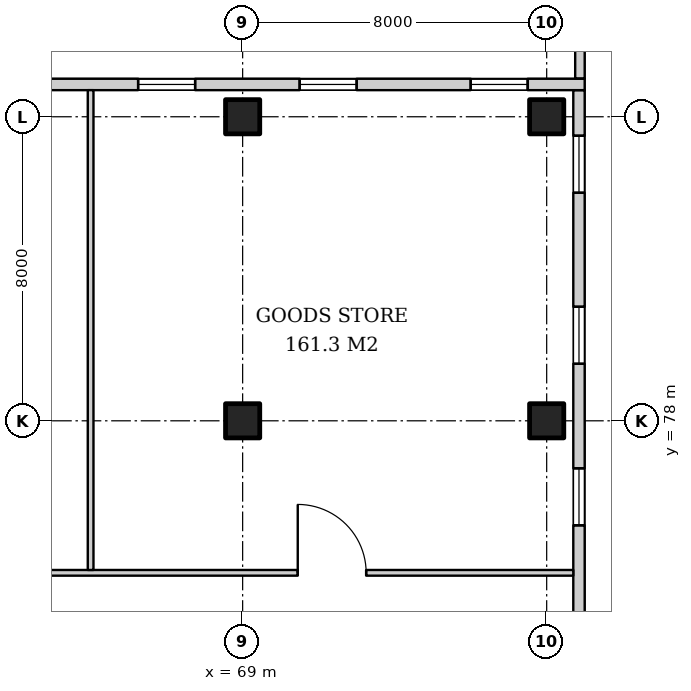
"""IFC4 building model, lengths in metres.
Left out: names, types, materials, properties, quantities, classifications, styles, units other than length and angle.
Written with IfcOpenShell. Run it as: python <this file> out.ifc"""

import sys

from ifc_helpers import new_model, si_unit, direction, frame, frame_2d, origin, origin_2d, place, context, subcontext, project, spatial, rectangle, extrude, element, fill, save


model = new_model("IFC4")
c1 = context("Model", 3, precision=1e-05, world=origin(), true_north=direction((0.0, 1.0)))
c2 = subcontext(c1, "Body", "Model", "MODEL_VIEW")
j1 = project(units=[si_unit("LENGTHUNIT", "METRE"), si_unit("PLANEANGLEUNIT", "RADIAN")], contexts=[c1])
p1 = place(None, origin())
s1 = spatial("IfcSite", under=j1, at=p1, CompositionType="ELEMENT")
p2 = place(p1, origin())
s2 = spatial("IfcBuilding", under=s1, at=p2, CompositionType="ELEMENT")
p3 = place(p2, frame((0.0, 0.0, 6.0)))
s3 = spatial("IfcBuildingStorey", under=s2, at=p3, CompositionType="ELEMENT", Elevation=6.0)
for number, where, z_axis, x_axis in (
    (1, (69.0, 78.0, 0.0), (0.0, 0.0, 1.0), (1.0, 0.0, 0.0)),
    (2, (69.0, 86.0, 0.0), (0.0, 0.0, 1.0), (1.0, 0.0, 0.0)),
    (3, (77.0, 78.0, 0.0), (0.0, 0.0, 1.0), (1.0, 0.0, 0.0)),
    (4, (77.0, 86.0, 0.0), (0.0, 0.0, 1.0), (1.0, 0.0, 0.0)),
):
    element("IfcColumn", number, at=place(p3, frame(where, z_axis=z_axis, x_axis=x_axis)), inside=s3, PredefinedType="COLUMN", context=c2, shape_type="SweptSolid", body=[
        extrude(rectangle(XDim=0.9, YDim=0.9, at=origin_2d()), origin(), (0.0, 0.0, 1.0), 5.0),
    ])
p4 = place(p3, frame((77.85, 50.5, 0.0), z_axis=(0.0, 0.0, 1.0), x_axis=(0.0, 1.0, 0.0)))
e5 = element("IfcWall", 5, at=p4, inside=s3, PredefinedType="SOLIDWALL", context=c2, shape_type="SweptSolid", body=[
    extrude(rectangle(XDim=36.2, YDim=0.3, at=frame_2d((18.1, 0.0))), origin(), (0.0, 0.0, 1.0), 4.7),
])
p5 = place(p4, frame((0.75, 0.0, 0.9)))
e6 = element("IfcOpeningElement", 6, at=p5, cuts=e5, PredefinedType="OPENING", context=c2, shape_type="SweptSolid", body=[
    extrude(rectangle(XDim=1.5, YDim=3.2, at=frame_2d((0.75, 1.6))), frame((0.0, 0.16, 0.0), z_axis=(0.0, -1.0, 0.0), x_axis=(1.0, 0.0, 0.0)), (0.0, 0.0, 1.0), 0.32),
])
p6 = place(p4, frame((4.75, 0.0, 0.9)))
e7 = element("IfcOpeningElement", 7, at=p6, cuts=e5, PredefinedType="OPENING", context=c2, shape_type="SweptSolid", body=[
    extrude(rectangle(XDim=1.5, YDim=3.2, at=frame_2d((0.75, 1.6))), frame((0.0, 0.16, 0.0), z_axis=(0.0, -1.0, 0.0), x_axis=(1.0, 0.0, 0.0)), (0.0, 0.0, 1.0), 0.32),
])
p7 = place(p4, frame((8.75, 0.0, 0.9)))
e8 = element("IfcOpeningElement", 8, at=p7, cuts=e5, PredefinedType="OPENING", context=c2, shape_type="SweptSolid", body=[
    extrude(rectangle(XDim=1.5, YDim=3.2, at=frame_2d((0.75, 1.6))), frame((0.0, 0.16, 0.0), z_axis=(0.0, -1.0, 0.0), x_axis=(1.0, 0.0, 0.0)), (0.0, 0.0, 1.0), 0.32),
])
p8 = place(p4, frame((12.75, 0.0, 0.9)))
e9 = element("IfcOpeningElement", 9, at=p8, cuts=e5, PredefinedType="OPENING", context=c2, shape_type="SweptSolid", body=[
    extrude(rectangle(XDim=1.5, YDim=3.2, at=frame_2d((0.75, 1.6))), frame((0.0, 0.16, 0.0), z_axis=(0.0, -1.0, 0.0), x_axis=(1.0, 0.0, 0.0)), (0.0, 0.0, 1.0), 0.32),
])
p9 = place(p4, frame((16.75, 0.0, 0.9)))
e10 = element("IfcOpeningElement", 10, at=p9, cuts=e5, PredefinedType="OPENING", context=c2, shape_type="SweptSolid", body=[
    extrude(rectangle(XDim=1.5, YDim=3.2, at=frame_2d((0.75, 1.6))), frame((0.0, 0.16, 0.0), z_axis=(0.0, -1.0, 0.0), x_axis=(1.0, 0.0, 0.0)), (0.0, 0.0, 1.0), 0.32),
])
p10 = place(p4, frame((20.75, 0.0, 0.9)))
e11 = element("IfcOpeningElement", 11, at=p10, cuts=e5, PredefinedType="OPENING", context=c2, shape_type="SweptSolid", body=[
    extrude(rectangle(XDim=1.5, YDim=3.2, at=frame_2d((0.75, 1.6))), frame((0.0, 0.16, 0.0), z_axis=(0.0, -1.0, 0.0), x_axis=(1.0, 0.0, 0.0)), (0.0, 0.0, 1.0), 0.32),
])
p11 = place(p4, frame((24.75, 0.0, 0.9)))
e12 = element("IfcOpeningElement", 12, at=p11, cuts=e5, PredefinedType="OPENING", context=c2, shape_type="SweptSolid", body=[
    extrude(rectangle(XDim=1.5, YDim=3.2, at=frame_2d((0.75, 1.6))), frame((0.0, 0.16, 0.0), z_axis=(0.0, -1.0, 0.0), x_axis=(1.0, 0.0, 0.0)), (0.0, 0.0, 1.0), 0.32),
])
p12 = place(p4, frame((29.0, 0.0, 0.9)))
e13 = element("IfcOpeningElement", 13, at=p12, cuts=e5, PredefinedType="OPENING", context=c2, shape_type="SweptSolid", body=[
    extrude(rectangle(XDim=1.5, YDim=3.2, at=frame_2d((0.75, 1.6))), frame((0.0, 0.16, 0.0), z_axis=(0.0, -1.0, 0.0), x_axis=(1.0, 0.0, 0.0)), (0.0, 0.0, 1.0), 0.32),
])
p13 = place(p4, frame((33.5, 0.0, 0.9)))
e14 = element("IfcOpeningElement", 14, at=p13, cuts=e5, PredefinedType="OPENING", context=c2, shape_type="SweptSolid", body=[
    extrude(rectangle(XDim=1.5, YDim=3.2, at=frame_2d((0.75, 1.6))), frame((0.0, 0.16, 0.0), z_axis=(0.0, -1.0, 0.0), x_axis=(1.0, 0.0, 0.0)), (0.0, 0.0, 1.0), 0.32),
])
p14 = place(p3, frame((78.0, 86.85, 0.0), z_axis=(0.0, 0.0, 1.0), x_axis=(-1.0, 0.0, 0.0)))
e15 = element("IfcWall", 15, at=p14, inside=s3, PredefinedType="SOLIDWALL", context=c2, shape_type="SweptSolid", body=[
    extrude(rectangle(XDim=66.0, YDim=0.3, at=frame_2d((33.0, 0.0))), origin(), (0.0, 0.0, 1.0), 4.7),
])
p15 = place(p14, frame((1.5, 0.0, 0.9)))
e16 = element("IfcOpeningElement", 16, at=p15, cuts=e15, PredefinedType="OPENING", context=c2, shape_type="SweptSolid", body=[
    extrude(rectangle(XDim=1.5, YDim=3.2, at=frame_2d((0.75, 1.6))), frame((0.0, 0.16, 0.0), z_axis=(0.0, -1.0, 0.0), x_axis=(1.0, 0.0, 0.0)), (0.0, 0.0, 1.0), 0.32),
])
p16 = place(p14, frame((6.0, 0.0, 0.9)))
e17 = element("IfcOpeningElement", 17, at=p16, cuts=e15, PredefinedType="OPENING", context=c2, shape_type="SweptSolid", body=[
    extrude(rectangle(XDim=1.5, YDim=3.2, at=frame_2d((0.75, 1.6))), frame((0.0, 0.16, 0.0), z_axis=(0.0, -1.0, 0.0), x_axis=(1.0, 0.0, 0.0)), (0.0, 0.0, 1.0), 0.32),
])
p17 = place(p14, frame((10.25, 0.0, 0.9)))
e18 = element("IfcOpeningElement", 18, at=p17, cuts=e15, PredefinedType="OPENING", context=c2, shape_type="SweptSolid", body=[
    extrude(rectangle(XDim=1.5, YDim=3.2, at=frame_2d((0.75, 1.6))), frame((0.0, 0.16, 0.0), z_axis=(0.0, -1.0, 0.0), x_axis=(1.0, 0.0, 0.0)), (0.0, 0.0, 1.0), 0.32),
])
p18 = place(p14, frame((14.25, 0.0, 0.9)))
e19 = element("IfcOpeningElement", 19, at=p18, cuts=e15, PredefinedType="OPENING", context=c2, shape_type="SweptSolid", body=[
    extrude(rectangle(XDim=1.5, YDim=3.2, at=frame_2d((0.75, 1.6))), frame((0.0, 0.16, 0.0), z_axis=(0.0, -1.0, 0.0), x_axis=(1.0, 0.0, 0.0)), (0.0, 0.0, 1.0), 0.32),
])
p19 = place(p14, frame((18.25, 0.0, 0.9)))
e20 = element("IfcOpeningElement", 20, at=p19, cuts=e15, PredefinedType="OPENING", context=c2, shape_type="SweptSolid", body=[
    extrude(rectangle(XDim=1.5, YDim=3.2, at=frame_2d((0.75, 1.6))), frame((0.0, 0.16, 0.0), z_axis=(0.0, -1.0, 0.0), x_axis=(1.0, 0.0, 0.0)), (0.0, 0.0, 1.0), 0.32),
])
p20 = place(p14, frame((22.25, 0.0, 0.9)))
e21 = element("IfcOpeningElement", 21, at=p20, cuts=e15, PredefinedType="OPENING", context=c2, shape_type="SweptSolid", body=[
    extrude(rectangle(XDim=1.5, YDim=3.2, at=frame_2d((0.75, 1.6))), frame((0.0, 0.16, 0.0), z_axis=(0.0, -1.0, 0.0), x_axis=(1.0, 0.0, 0.0)), (0.0, 0.0, 1.0), 0.32),
])
p21 = place(p14, frame((26.25, 0.0, 0.9)))
e22 = element("IfcOpeningElement", 22, at=p21, cuts=e15, PredefinedType="OPENING", context=c2, shape_type="SweptSolid", body=[
    extrude(rectangle(XDim=1.5, YDim=3.2, at=frame_2d((0.75, 1.6))), frame((0.0, 0.16, 0.0), z_axis=(0.0, -1.0, 0.0), x_axis=(1.0, 0.0, 0.0)), (0.0, 0.0, 1.0), 0.32),
])
p22 = place(p14, frame((30.25, 0.0, 0.9)))
e23 = element("IfcOpeningElement", 23, at=p22, cuts=e15, PredefinedType="OPENING", context=c2, shape_type="SweptSolid", body=[
    extrude(rectangle(XDim=1.5, YDim=3.2, at=frame_2d((0.75, 1.6))), frame((0.0, 0.16, 0.0), z_axis=(0.0, -1.0, 0.0), x_axis=(1.0, 0.0, 0.0)), (0.0, 0.0, 1.0), 0.32),
])
p23 = place(p14, frame((34.1, 0.0, 0.0)))
e24 = element("IfcOpeningElement", 24, at=p23, cuts=e15, PredefinedType="OPENING", context=c2, shape_type="SweptSolid", body=[
    extrude(rectangle(XDim=1.8, YDim=2.4, at=frame_2d((0.9, 1.2))), frame((0.0, 0.16, 0.0), z_axis=(0.0, -1.0, 0.0), x_axis=(1.0, 0.0, 0.0)), (0.0, 0.0, 1.0), 0.32),
])
p24 = place(p14, frame((38.25, 0.0, 0.9)))
e25 = element("IfcOpeningElement", 25, at=p24, cuts=e15, PredefinedType="OPENING", context=c2, shape_type="SweptSolid", body=[
    extrude(rectangle(XDim=1.5, YDim=3.2, at=frame_2d((0.75, 1.6))), frame((0.0, 0.16, 0.0), z_axis=(0.0, -1.0, 0.0), x_axis=(1.0, 0.0, 0.0)), (0.0, 0.0, 1.0), 0.32),
])
p25 = place(p14, frame((42.25, 0.0, 0.9)))
e26 = element("IfcOpeningElement", 26, at=p25, cuts=e15, PredefinedType="OPENING", context=c2, shape_type="SweptSolid", body=[
    extrude(rectangle(XDim=1.5, YDim=3.2, at=frame_2d((0.75, 1.6))), frame((0.0, 0.16, 0.0), z_axis=(0.0, -1.0, 0.0), x_axis=(1.0, 0.0, 0.0)), (0.0, 0.0, 1.0), 0.32),
])
p26 = place(p14, frame((46.25, 0.0, 0.9)))
e27 = element("IfcOpeningElement", 27, at=p26, cuts=e15, PredefinedType="OPENING", context=c2, shape_type="SweptSolid", body=[
    extrude(rectangle(XDim=1.5, YDim=3.2, at=frame_2d((0.75, 1.6))), frame((0.0, 0.16, 0.0), z_axis=(0.0, -1.0, 0.0), x_axis=(1.0, 0.0, 0.0)), (0.0, 0.0, 1.0), 0.32),
])
p27 = place(p14, frame((50.25, 0.0, 0.9)))
e28 = element("IfcOpeningElement", 28, at=p27, cuts=e15, PredefinedType="OPENING", context=c2, shape_type="SweptSolid", body=[
    extrude(rectangle(XDim=1.5, YDim=3.2, at=frame_2d((0.75, 1.6))), frame((0.0, 0.16, 0.0), z_axis=(0.0, -1.0, 0.0), x_axis=(1.0, 0.0, 0.0)), (0.0, 0.0, 1.0), 0.32),
])
p28 = place(p14, frame((54.25, 0.0, 0.9)))
e29 = element("IfcOpeningElement", 29, at=p28, cuts=e15, PredefinedType="OPENING", context=c2, shape_type="SweptSolid", body=[
    extrude(rectangle(XDim=1.5, YDim=3.2, at=frame_2d((0.75, 1.6))), frame((0.0, 0.16, 0.0), z_axis=(0.0, -1.0, 0.0), x_axis=(1.0, 0.0, 0.0)), (0.0, 0.0, 1.0), 0.32),
])
p29 = place(p14, frame((58.5, 0.0, 0.9)))
e30 = element("IfcOpeningElement", 30, at=p29, cuts=e15, PredefinedType="OPENING", context=c2, shape_type="SweptSolid", body=[
    extrude(rectangle(XDim=1.5, YDim=3.2, at=frame_2d((0.75, 1.6))), frame((0.0, 0.16, 0.0), z_axis=(0.0, -1.0, 0.0), x_axis=(1.0, 0.0, 0.0)), (0.0, 0.0, 1.0), 0.32),
])
p30 = place(p14, frame((63.0, 0.0, 0.9)))
e31 = element("IfcOpeningElement", 31, at=p30, cuts=e15, PredefinedType="OPENING", context=c2, shape_type="SweptSolid", body=[
    extrude(rectangle(XDim=1.5, YDim=3.2, at=frame_2d((0.75, 1.6))), frame((0.0, 0.16, 0.0), z_axis=(0.0, -1.0, 0.0), x_axis=(1.0, 0.0, 0.0)), (0.0, 0.0, 1.0), 0.32),
])
p31 = place(p3, frame((77.875, 87.01, 0.0), z_axis=(0.0, 0.0, 1.0), x_axis=(0.0, 1.0, 0.0)))
e32 = element("IfcWall", 32, at=p31, inside=s3, PredefinedType="PARAPET", context=c2, shape_type="SweptSolid", body=[
    extrude(rectangle(XDim=7.74, YDim=0.25, at=frame_2d((3.87, 0.0))), origin(), (0.0, 0.0, 1.0), 1.1),
])
p32 = place(p3, frame((16.925, 74.0, 0.0), z_axis=(0.0, 0.0, 1.0), x_axis=(1.0, 0.0, 0.0)))
e33 = element("IfcWall", 33, at=p32, inside=s3, PredefinedType="PARTITIONING", context=c2, shape_type="SweptSolid", body=[
    extrude(rectangle(XDim=60.775, YDim=0.15, at=frame_2d((30.387, 0.0))), origin(), (0.0, 0.0, 1.0), 4.7),
])
p33 = place(p32, frame((7.175, 0.0, 0.0)))
e34 = element("IfcOpeningElement", 34, at=p33, cuts=e33, PredefinedType="OPENING", context=c2, shape_type="SweptSolid", body=[
    extrude(rectangle(XDim=1.8, YDim=2.4, at=frame_2d((0.9, 1.2))), frame((0.0, 0.085, 0.0), z_axis=(0.0, -1.0, 0.0), x_axis=(1.0, 0.0, 0.0)), (0.0, 0.0, 1.0), 0.17),
])
p34 = place(p32, frame((23.175, 0.0, 0.0)))
e35 = element("IfcOpeningElement", 35, at=p34, cuts=e33, PredefinedType="OPENING", context=c2, shape_type="SweptSolid", body=[
    extrude(rectangle(XDim=1.8, YDim=2.4, at=frame_2d((0.9, 1.2))), frame((0.0, 0.085, 0.0), z_axis=(0.0, -1.0, 0.0), x_axis=(1.0, 0.0, 0.0)), (0.0, 0.0, 1.0), 0.17),
])
p35 = place(p32, frame((39.175, 0.0, 0.0)))
e36 = element("IfcOpeningElement", 36, at=p35, cuts=e33, PredefinedType="OPENING", context=c2, shape_type="SweptSolid", body=[
    extrude(rectangle(XDim=1.8, YDim=2.4, at=frame_2d((0.9, 1.2))), frame((0.0, 0.085, 0.0), z_axis=(0.0, -1.0, 0.0), x_axis=(1.0, 0.0, 0.0)), (0.0, 0.0, 1.0), 0.17),
])
p36 = place(p32, frame((53.525, 0.0, 0.0)))
e37 = element("IfcOpeningElement", 37, at=p36, cuts=e33, PredefinedType="OPENING", context=c2, shape_type="SweptSolid", body=[
    extrude(rectangle(XDim=1.8, YDim=2.4, at=frame_2d((0.9, 1.2))), frame((0.0, 0.085, 0.0), z_axis=(0.0, -1.0, 0.0), x_axis=(1.0, 0.0, 0.0)), (0.0, 0.0, 1.0), 0.17),
])
p37 = place(p3, frame((65.0, 74.075, 0.0), z_axis=(0.0, 0.0, 1.0), x_axis=(0.0, 1.0, 0.0)))
e38 = element("IfcWall", 38, at=p37, inside=s3, PredefinedType="PARTITIONING", context=c2, shape_type="SweptSolid", body=[
    extrude(rectangle(XDim=12.625, YDim=0.15, at=frame_2d((6.312, 0.0))), origin(), (0.0, 0.0, 1.0), 3.2),
])
p38 = place(p11, origin())
e39 = element("IfcWindow", 39, at=p38, inside=s3, PartitioningType="SINGLE_PANEL", PredefinedType="WINDOW", context=c2, shape_type="SweptSolid", body=[
    extrude(rectangle(XDim=1.5, YDim=3.2, at=frame_2d((0.75, 1.6))), frame((0.0, 0.03, 0.0), z_axis=(0.0, -1.0, 0.0), x_axis=(1.0, 0.0, 0.0)), (0.0, 0.0, 1.0), 0.06),
])
fill(e12, e39)
p39 = place(p12, origin())
e40 = element("IfcWindow", 40, at=p39, inside=s3, PartitioningType="SINGLE_PANEL", PredefinedType="WINDOW", context=c2, shape_type="SweptSolid", body=[
    extrude(rectangle(XDim=1.5, YDim=3.2, at=frame_2d((0.75, 1.6))), frame((0.0, 0.03, 0.0), z_axis=(0.0, -1.0, 0.0), x_axis=(1.0, 0.0, 0.0)), (0.0, 0.0, 1.0), 0.06),
])
fill(e13, e40)
p40 = place(p13, origin())
e41 = element("IfcWindow", 41, at=p40, inside=s3, PartitioningType="SINGLE_PANEL", PredefinedType="WINDOW", context=c2, shape_type="SweptSolid", body=[
    extrude(rectangle(XDim=1.5, YDim=3.2, at=frame_2d((0.75, 1.6))), frame((0.0, 0.03, 0.0), z_axis=(0.0, -1.0, 0.0), x_axis=(1.0, 0.0, 0.0)), (0.0, 0.0, 1.0), 0.06),
])
fill(e14, e41)
p41 = place(p15, origin())
e42 = element("IfcWindow", 42, at=p41, inside=s3, PartitioningType="SINGLE_PANEL", PredefinedType="WINDOW", context=c2, shape_type="SweptSolid", body=[
    extrude(rectangle(XDim=1.5, YDim=3.2, at=frame_2d((0.75, 1.6))), frame((0.0, 0.03, 0.0), z_axis=(0.0, -1.0, 0.0), x_axis=(1.0, 0.0, 0.0)), (0.0, 0.0, 1.0), 0.06),
])
fill(e16, e42)
p42 = place(p16, origin())
e43 = element("IfcWindow", 43, at=p42, inside=s3, PartitioningType="SINGLE_PANEL", PredefinedType="WINDOW", context=c2, shape_type="SweptSolid", body=[
    extrude(rectangle(XDim=1.5, YDim=3.2, at=frame_2d((0.75, 1.6))), frame((0.0, 0.03, 0.0), z_axis=(0.0, -1.0, 0.0), x_axis=(1.0, 0.0, 0.0)), (0.0, 0.0, 1.0), 0.06),
])
fill(e17, e43)
p43 = place(p17, origin())
e44 = element("IfcWindow", 44, at=p43, inside=s3, PartitioningType="SINGLE_PANEL", PredefinedType="WINDOW", context=c2, shape_type="SweptSolid", body=[
    extrude(rectangle(XDim=1.5, YDim=3.2, at=frame_2d((0.75, 1.6))), frame((0.0, 0.03, 0.0), z_axis=(0.0, -1.0, 0.0), x_axis=(1.0, 0.0, 0.0)), (0.0, 0.0, 1.0), 0.06),
])
fill(e18, e44)
p44 = place(p36, origin())
e45 = element("IfcDoor", 45, at=p44, inside=s3, OperationType="DOUBLE_DOOR_SINGLE_SWING", PredefinedType="DOOR", context=c2, shape_type="SweptSolid", body=[
    extrude(rectangle(XDim=1.8, YDim=2.4, at=frame_2d((0.9, 1.2))), frame((0.0, 0.025, 0.0), z_axis=(0.0, -1.0, 0.0), x_axis=(1.0, 0.0, 0.0)), (0.0, 0.0, 1.0), 0.05),
])
fill(e37, e45)
save(model, sys.argv[1])
